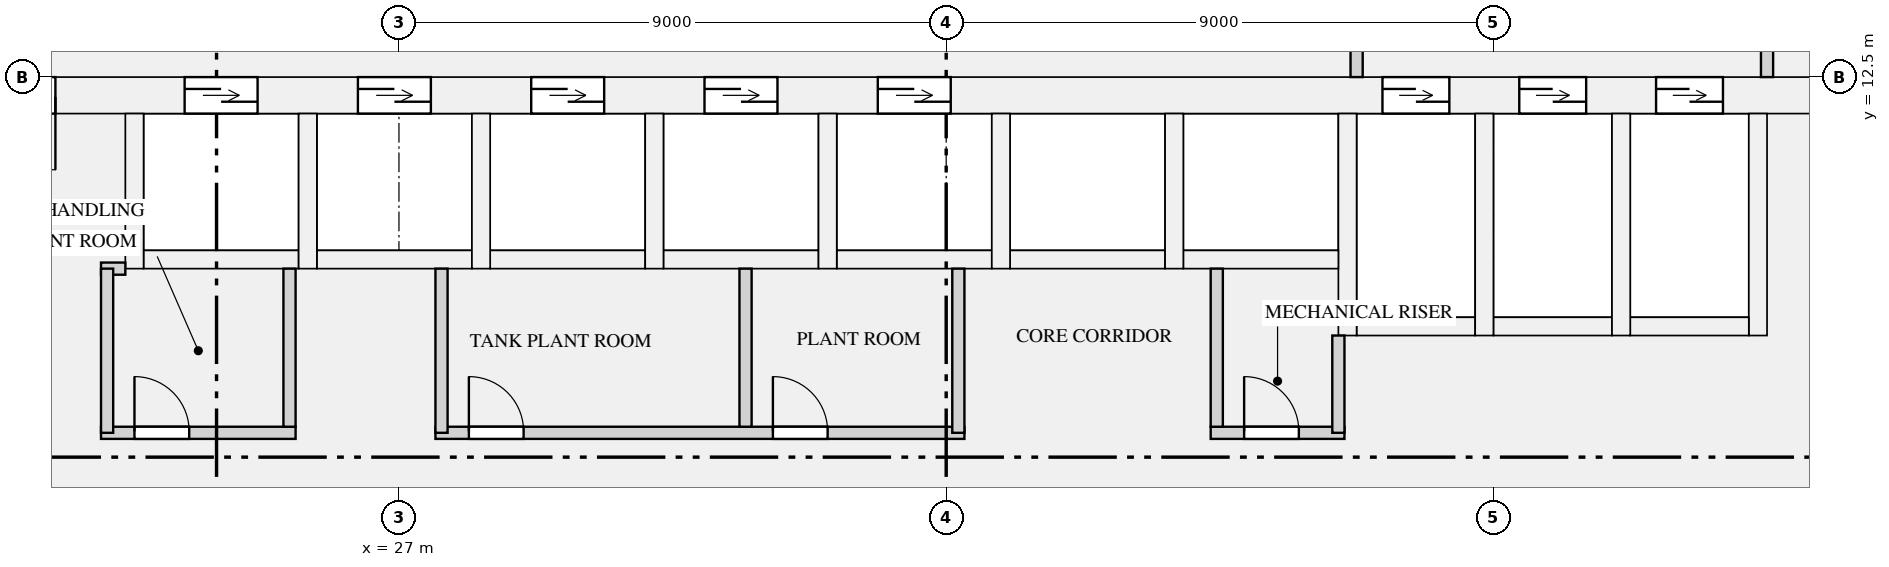
"""IFC4 building model, lengths in metres.
Left out: names, types, materials, properties, quantities, classifications, styles, units other than length and angle.
Written with IfcOpenShell. Run it as: python <this file> out.ifc"""

import sys

from ifc_helpers import new_model, si_unit, direction, frame, frame_2d, origin, place, context, subcontext, project, spatial, rectangle, extrude, element, fill, save


model = new_model("IFC4")
c1 = context("Model", 3, precision=1e-05, world=origin(), true_north=direction((0.0, 1.0)))
c2 = subcontext(c1, "Body", "Model", "MODEL_VIEW")
j1 = project(units=[si_unit("LENGTHUNIT", "METRE"), si_unit("PLANEANGLEUNIT", "RADIAN")], contexts=[c1])
p1 = place(None, origin())
s1 = spatial("IfcSite", under=j1, at=p1, CompositionType="ELEMENT")
p2 = place(p1, origin())
s2 = spatial("IfcBuilding", under=s1, at=p2, CompositionType="ELEMENT")
p3 = place(p2, frame((0.0, 0.0, 15.5)))
s3 = spatial("IfcBuildingStorey", under=s2, at=p3, CompositionType="ELEMENT", Elevation=15.5)
p4 = place(p3, frame((19.0, 12.2, 0.0), z_axis=(0.0, 0.0, 1.0), x_axis=(1.0, 0.0, 0.0)))
e1 = element("IfcWall", 1, at=p4, inside=s3, PredefinedType="SHEAR", context=c2, shape_type="SweptSolid", body=[
    extrude(rectangle(XDim=34.0, YDim=0.6, at=frame_2d((17.0, 0.0))), origin(), (0.0, 0.0, 1.0), 4.0),
])
p5 = place(p4, frame((4.475, 0.0, 0.0)))
e2 = element("IfcOpeningElement", 2, at=p5, cuts=e1, PredefinedType="OPENING", context=c2, shape_type="SweptSolid", body=[
    extrude(rectangle(XDim=1.2, YDim=2.1, at=frame_2d((0.6, 1.05))), frame((0.0, 0.31, 0.0), z_axis=(0.0, -1.0, 0.0), x_axis=(1.0, 0.0, 0.0)), (0.0, 0.0, 1.0), 0.62),
])
p6 = place(p4, frame((7.325, 0.0, 0.0)))
e3 = element("IfcOpeningElement", 3, at=p6, cuts=e1, PredefinedType="OPENING", context=c2, shape_type="SweptSolid", body=[
    extrude(rectangle(XDim=1.2, YDim=2.1, at=frame_2d((0.6, 1.05))), frame((0.0, 0.31, 0.0), z_axis=(0.0, -1.0, 0.0), x_axis=(1.0, 0.0, 0.0)), (0.0, 0.0, 1.0), 0.62),
])
p7 = place(p4, frame((10.175, 0.0, 0.0)))
e4 = element("IfcOpeningElement", 4, at=p7, cuts=e1, PredefinedType="OPENING", context=c2, shape_type="SweptSolid", body=[
    extrude(rectangle(XDim=1.2, YDim=2.1, at=frame_2d((0.6, 1.05))), frame((0.0, 0.31, 0.0), z_axis=(0.0, -1.0, 0.0), x_axis=(1.0, 0.0, 0.0)), (0.0, 0.0, 1.0), 0.62),
])
p8 = place(p4, frame((13.025, 0.0, 0.0)))
e5 = element("IfcOpeningElement", 5, at=p8, cuts=e1, PredefinedType="OPENING", context=c2, shape_type="SweptSolid", body=[
    extrude(rectangle(XDim=1.2, YDim=2.1, at=frame_2d((0.6, 1.05))), frame((0.0, 0.31, 0.0), z_axis=(0.0, -1.0, 0.0), x_axis=(1.0, 0.0, 0.0)), (0.0, 0.0, 1.0), 0.62),
])
p9 = place(p4, frame((15.875, 0.0, 0.0)))
e6 = element("IfcOpeningElement", 6, at=p9, cuts=e1, PredefinedType="OPENING", context=c2, shape_type="SweptSolid", body=[
    extrude(rectangle(XDim=1.2, YDim=2.1, at=frame_2d((0.6, 1.05))), frame((0.0, 0.31, 0.0), z_axis=(0.0, -1.0, 0.0), x_axis=(1.0, 0.0, 0.0)), (0.0, 0.0, 1.0), 0.62),
])
p10 = place(p4, frame((24.175, 0.0, 0.0)))
e7 = element("IfcOpeningElement", 7, at=p10, cuts=e1, PredefinedType="OPENING", context=c2, shape_type="SweptSolid", body=[
    extrude(rectangle(XDim=1.1, YDim=2.1, at=frame_2d((0.55, 1.05))), frame((0.0, 0.31, 0.0), z_axis=(0.0, -1.0, 0.0), x_axis=(1.0, 0.0, 0.0)), (0.0, 0.0, 1.0), 0.62),
])
p11 = place(p4, frame((26.425, 0.0, 0.0)))
e8 = element("IfcOpeningElement", 8, at=p11, cuts=e1, PredefinedType="OPENING", context=c2, shape_type="SweptSolid", body=[
    extrude(rectangle(XDim=1.1, YDim=2.1, at=frame_2d((0.55, 1.05))), frame((0.0, 0.31, 0.0), z_axis=(0.0, -1.0, 0.0), x_axis=(1.0, 0.0, 0.0)), (0.0, 0.0, 1.0), 0.62),
])
p12 = place(p4, frame((28.675, 0.0, 0.0)))
e9 = element("IfcOpeningElement", 9, at=p12, cuts=e1, PredefinedType="OPENING", context=c2, shape_type="SweptSolid", body=[
    extrude(rectangle(XDim=1.1, YDim=2.1, at=frame_2d((0.55, 1.05))), frame((0.0, 0.31, 0.0), z_axis=(0.0, -1.0, 0.0), x_axis=(1.0, 0.0, 0.0)), (0.0, 0.0, 1.0), 0.62),
])
p13 = place(p4, frame((1.15, 0.0, 0.0)))
e10 = element("IfcOpeningElement", 10, at=p13, cuts=e1, PredefinedType="OPENING", context=c2, shape_type="SweptSolid", body=[
    extrude(rectangle(XDim=1.2, YDim=2.1, at=frame_2d((0.6, 1.05))), frame((0.0, 0.31, 0.0), z_axis=(0.0, -1.0, 0.0), x_axis=(1.0, 0.0, 0.0)), (0.0, 0.0, 1.0), 0.62),
])
p14 = place(p4, frame((31.65, 0.0, 0.0)))
e11 = element("IfcOpeningElement", 11, at=p14, cuts=e1, PredefinedType="OPENING", context=c2, shape_type="SweptSolid", body=[
    extrude(rectangle(XDim=1.2, YDim=2.1, at=frame_2d((0.6, 1.05))), frame((0.0, 0.31, 0.0), z_axis=(0.0, -1.0, 0.0), x_axis=(1.0, 0.0, 0.0)), (0.0, 0.0, 1.0), 0.62),
])
p15 = place(p3, frame((22.8, 9.5, 0.0), z_axis=(0.0, 0.0, 1.0), x_axis=(1.0, 0.0, 0.0)))
e12 = element("IfcWall", 12, at=p15, inside=s3, PredefinedType="SHEAR", context=c2, shape_type="SweptSolid", body=[
    extrude(rectangle(XDim=2.55, YDim=0.3, at=frame_2d((1.275, 0.0))), origin(), (0.0, 0.0, 1.0), 4.0),
])
p16 = place(p3, frame((22.65, 9.35, 0.0), z_axis=(0.0, 0.0, 1.0), x_axis=(0.0, 1.0, 0.0)))
e13 = element("IfcWall", 13, at=p16, inside=s3, PredefinedType="SHEAR", context=c2, shape_type="SweptSolid", body=[
    extrude(rectangle(XDim=2.55, YDim=0.3, at=frame_2d((1.275, 0.0))), origin(), (0.0, 0.0, 1.0), 4.0),
])
p17 = place(p3, frame((25.65, 9.5, 0.0), z_axis=(0.0, 0.0, 1.0), x_axis=(1.0, 0.0, 0.0)))
e14 = element("IfcWall", 14, at=p17, inside=s3, PredefinedType="SHEAR", context=c2, shape_type="SweptSolid", body=[
    extrude(rectangle(XDim=2.55, YDim=0.3, at=frame_2d((1.275, 0.0))), origin(), (0.0, 0.0, 1.0), 4.0),
])
p18 = place(p3, frame((25.5, 9.35, 0.0), z_axis=(0.0, 0.0, 1.0), x_axis=(0.0, 1.0, 0.0)))
e15 = element("IfcWall", 15, at=p18, inside=s3, PredefinedType="SHEAR", context=c2, shape_type="SweptSolid", body=[
    extrude(rectangle(XDim=2.55, YDim=0.3, at=frame_2d((1.275, 0.0))), origin(), (0.0, 0.0, 1.0), 4.0),
])
p19 = place(p3, frame((28.5, 9.5, 0.0), z_axis=(0.0, 0.0, 1.0), x_axis=(1.0, 0.0, 0.0)))
e16 = element("IfcWall", 16, at=p19, inside=s3, PredefinedType="SHEAR", context=c2, shape_type="SweptSolid", body=[
    extrude(rectangle(XDim=2.55, YDim=0.3, at=frame_2d((1.275, 0.0))), origin(), (0.0, 0.0, 1.0), 4.0),
])
for number, where, z_axis, x_axis in (
    (17, (28.35, 9.35, 0.0), (0.0, 0.0, 1.0), (0.0, 1.0, 0.0)),
    (18, (31.35, 9.5, 0.0), (0.0, 0.0, 1.0), (1.0, 0.0, 0.0)),
    (19, (31.2, 9.35, 0.0), (0.0, 0.0, 1.0), (0.0, 1.0, 0.0)),
):
    element("IfcWall", number, at=place(p3, frame(where, z_axis=z_axis, x_axis=x_axis)), inside=s3, PredefinedType="SHEAR", context=c2, shape_type="SweptSolid", body=[
        extrude(rectangle(XDim=2.55, YDim=0.3, at=frame_2d((1.275, 0.0))), origin(), (0.0, 0.0, 1.0), 4.0),
    ])
p20 = place(p3, frame((34.2, 9.5, 0.0), z_axis=(0.0, 0.0, 1.0), x_axis=(1.0, 0.0, 0.0)))
e20 = element("IfcWall", 20, at=p20, inside=s3, PredefinedType="SHEAR", context=c2, shape_type="SweptSolid", body=[
    extrude(rectangle(XDim=2.55, YDim=0.3, at=frame_2d((1.275, 0.0))), origin(), (0.0, 0.0, 1.0), 4.0),
])
p21 = place(p3, frame((34.05, 9.35, 0.0), z_axis=(0.0, 0.0, 1.0), x_axis=(0.0, 1.0, 0.0)))
e21 = element("IfcWall", 21, at=p21, inside=s3, PredefinedType="SHEAR", context=c2, shape_type="SweptSolid", body=[
    extrude(rectangle(XDim=2.55, YDim=0.3, at=frame_2d((1.275, 0.0))), origin(), (0.0, 0.0, 1.0), 4.0),
])
p22 = place(p3, frame((37.05, 9.5, 0.0), z_axis=(0.0, 0.0, 1.0), x_axis=(1.0, 0.0, 0.0)))
e22 = element("IfcWall", 22, at=p22, inside=s3, PredefinedType="SHEAR", context=c2, shape_type="SweptSolid", body=[
    extrude(rectangle(XDim=2.55, YDim=0.3, at=frame_2d((1.275, 0.0))), origin(), (0.0, 0.0, 1.0), 4.0),
])
p23 = place(p3, frame((36.9, 9.35, 0.0), z_axis=(0.0, 0.0, 1.0), x_axis=(0.0, 1.0, 0.0)))
e23 = element("IfcWall", 23, at=p23, inside=s3, PredefinedType="SHEAR", context=c2, shape_type="SweptSolid", body=[
    extrude(rectangle(XDim=2.55, YDim=0.3, at=frame_2d((1.275, 0.0))), origin(), (0.0, 0.0, 1.0), 4.0),
])
p24 = place(p3, frame((39.9, 9.5, 0.0), z_axis=(0.0, 0.0, 1.0), x_axis=(1.0, 0.0, 0.0)))
e24 = element("IfcWall", 24, at=p24, inside=s3, PredefinedType="SHEAR", context=c2, shape_type="SweptSolid", body=[
    extrude(rectangle(XDim=2.55, YDim=0.3, at=frame_2d((1.275, 0.0))), origin(), (0.0, 0.0, 1.0), 4.0),
])
p25 = place(p3, frame((39.75, 9.35, 0.0), z_axis=(0.0, 0.0, 1.0), x_axis=(0.0, 1.0, 0.0)))
e25 = element("IfcWall", 25, at=p25, inside=s3, PredefinedType="SHEAR", context=c2, shape_type="SweptSolid", body=[
    extrude(rectangle(XDim=2.55, YDim=0.3, at=frame_2d((1.275, 0.0))), origin(), (0.0, 0.0, 1.0), 4.0),
])
p26 = place(p3, frame((42.75, 8.4, 0.0), z_axis=(0.0, 0.0, 1.0), x_axis=(1.0, 0.0, 0.0)))
e26 = element("IfcWall", 26, at=p26, inside=s3, PredefinedType="SHEAR", context=c2, shape_type="SweptSolid", body=[
    extrude(rectangle(XDim=1.95, YDim=0.3, at=frame_2d((0.975, 0.0))), origin(), (0.0, 0.0, 1.0), 4.0),
])
p27 = place(p3, frame((42.6, 8.25, 0.0), z_axis=(0.0, 0.0, 1.0), x_axis=(0.0, 1.0, 0.0)))
e27 = element("IfcWall", 27, at=p27, inside=s3, PredefinedType="SHEAR", context=c2, shape_type="SweptSolid", body=[
    extrude(rectangle(XDim=3.65, YDim=0.3, at=frame_2d((1.825, 0.0))), origin(), (0.0, 0.0, 1.0), 4.0),
])
p28 = place(p3, frame((45.0, 8.4, 0.0), z_axis=(0.0, 0.0, 1.0), x_axis=(1.0, 0.0, 0.0)))
e28 = element("IfcWall", 28, at=p28, inside=s3, PredefinedType="SHEAR", context=c2, shape_type="SweptSolid", body=[
    extrude(rectangle(XDim=1.95, YDim=0.3, at=frame_2d((0.975, 0.0))), origin(), (0.0, 0.0, 1.0), 4.0),
])
p29 = place(p3, frame((44.85, 8.25, 0.0), z_axis=(0.0, 0.0, 1.0), x_axis=(0.0, 1.0, 0.0)))
e29 = element("IfcWall", 29, at=p29, inside=s3, PredefinedType="SHEAR", context=c2, shape_type="SweptSolid", body=[
    extrude(rectangle(XDim=3.65, YDim=0.3, at=frame_2d((1.825, 0.0))), origin(), (0.0, 0.0, 1.0), 4.0),
])
p30 = place(p3, frame((47.25, 8.4, 0.0), z_axis=(0.0, 0.0, 1.0), x_axis=(1.0, 0.0, 0.0)))
e30 = element("IfcWall", 30, at=p30, inside=s3, PredefinedType="SHEAR", context=c2, shape_type="SweptSolid", body=[
    extrude(rectangle(XDim=1.95, YDim=0.3, at=frame_2d((0.975, 0.0))), origin(), (0.0, 0.0, 1.0), 4.0),
])
for number, where, z_axis, x_axis in (
    (31, (47.1, 8.25, 0.0), (0.0, 0.0, 1.0), (0.0, 1.0, 0.0)),
    (32, (49.35, 8.25, 0.0), (0.0, 0.0, 1.0), (0.0, 1.0, 0.0)),
):
    element("IfcWall", number, at=place(p3, frame(where, z_axis=z_axis, x_axis=x_axis)), inside=s3, PredefinedType="SHEAR", context=c2, shape_type="SweptSolid", body=[
        extrude(rectangle(XDim=3.65, YDim=0.3, at=frame_2d((1.825, 0.0))), origin(), (0.0, 0.0, 1.0), 4.0),
    ])
p31 = place(p3, frame((22.1, 6.65, 0.0), z_axis=(0.0, 0.0, 1.0), x_axis=(1.0, 0.0, 0.0)))
e33 = element("IfcWall", 33, at=p31, inside=s3, PredefinedType="PARTITIONING", context=c2, shape_type="SweptSolid", body=[
    extrude(rectangle(XDim=3.2, YDim=0.2, at=frame_2d((1.6, 0.0))), origin(), (0.0, 0.0, 1.0), 3.68),
])
p32 = place(p31, frame((0.55, 0.0, 0.0)))
e34 = element("IfcOpeningElement", 34, at=p32, cuts=e33, PredefinedType="OPENING", context=c2, shape_type="SweptSolid", body=[
    extrude(rectangle(XDim=0.9, YDim=2.1, at=frame_2d((0.45, 1.05))), frame((0.0, 0.11, 0.0), z_axis=(0.0, -1.0, 0.0), x_axis=(1.0, 0.0, 0.0)), (0.0, 0.0, 1.0), 0.22),
])
p33 = place(p3, frame((27.6, 6.65, 0.0), z_axis=(0.0, 0.0, 1.0), x_axis=(1.0, 0.0, 0.0)))
e35 = element("IfcWall", 35, at=p33, inside=s3, PredefinedType="PARTITIONING", context=c2, shape_type="SweptSolid", body=[
    extrude(rectangle(XDim=8.7, YDim=0.2, at=frame_2d((4.35, 0.0))), origin(), (0.0, 0.0, 1.0), 3.68),
])
p34 = place(p33, frame((0.55, 0.0, 0.0)))
e36 = element("IfcOpeningElement", 36, at=p34, cuts=e35, PredefinedType="OPENING", context=c2, shape_type="SweptSolid", body=[
    extrude(rectangle(XDim=0.9, YDim=2.1, at=frame_2d((0.45, 1.05))), frame((0.0, 0.11, 0.0), z_axis=(0.0, -1.0, 0.0), x_axis=(1.0, 0.0, 0.0)), (0.0, 0.0, 1.0), 0.22),
])
p35 = place(p33, frame((5.55, 0.0, 0.0)))
e37 = element("IfcOpeningElement", 37, at=p35, cuts=e35, PredefinedType="OPENING", context=c2, shape_type="SweptSolid", body=[
    extrude(rectangle(XDim=0.9, YDim=2.1, at=frame_2d((0.45, 1.05))), frame((0.0, 0.11, 0.0), z_axis=(0.0, -1.0, 0.0), x_axis=(1.0, 0.0, 0.0)), (0.0, 0.0, 1.0), 0.22),
])
p36 = place(p3, frame((40.35, 6.65, 0.0), z_axis=(0.0, 0.0, 1.0), x_axis=(1.0, 0.0, 0.0)))
e38 = element("IfcWall", 38, at=p36, inside=s3, PredefinedType="PARTITIONING", context=c2, shape_type="SweptSolid", body=[
    extrude(rectangle(XDim=2.2, YDim=0.2, at=frame_2d((1.1, 0.0))), origin(), (0.0, 0.0, 1.0), 3.68),
])
p37 = place(p36, frame((0.55, 0.0, 0.0)))
e39 = element("IfcOpeningElement", 39, at=p37, cuts=e38, PredefinedType="OPENING", context=c2, shape_type="SweptSolid", body=[
    extrude(rectangle(XDim=0.9, YDim=2.1, at=frame_2d((0.45, 1.05))), frame((0.0, 0.11, 0.0), z_axis=(0.0, -1.0, 0.0), x_axis=(1.0, 0.0, 0.0)), (0.0, 0.0, 1.0), 0.22),
])
p38 = place(p3, frame((22.1, 9.35, 0.0), z_axis=(0.0, 0.0, 1.0), x_axis=(1.0, 0.0, 0.0)))
e40 = element("IfcWall", 40, at=p38, inside=s3, PredefinedType="PARTITIONING", context=c2, shape_type="SweptSolid", body=[
    extrude(rectangle(XDim=0.4, YDim=0.2, at=frame_2d((0.2, 0.0))), origin(), (0.0, 0.0, 1.0), 3.68),
])
for number, where, z_axis, x_axis in (
    (41, (22.2, 6.65, 0.0), (0.0, 0.0, 1.0), (0.0, 1.0, 0.0)),
    (42, (27.7, 6.65, 0.0), (0.0, 0.0, 1.0), (0.0, 1.0, 0.0)),
    (43, (36.2, 6.65, 0.0), (0.0, 0.0, 1.0), (0.0, 1.0, 0.0)),
):
    element("IfcWall", number, at=place(p3, frame(where, z_axis=z_axis, x_axis=x_axis)), inside=s3, PredefinedType="PARTITIONING", context=c2, shape_type="SweptSolid", body=[
        extrude(rectangle(XDim=2.7, YDim=0.2, at=frame_2d((1.35, 0.0))), origin(), (0.0, 0.0, 1.0), 3.68),
    ])
p39 = place(p3, frame((42.45, 6.65, 0.0), z_axis=(0.0, 0.0, 1.0), x_axis=(0.0, 1.0, 0.0)))
e44 = element("IfcWall", 44, at=p39, inside=s3, PredefinedType="PARTITIONING", context=c2, shape_type="SweptSolid", body=[
    extrude(rectangle(XDim=1.6, YDim=0.2, at=frame_2d((0.8, 0.0))), origin(), (0.0, 0.0, 1.0), 3.68),
])
for number, where, z_axis, x_axis in (
    (45, (25.2, 6.75, 0.0), (0.0, 0.0, 1.0), (0.0, 1.0, 0.0)),
    (46, (32.7, 6.75, 0.0), (0.0, 0.0, 1.0), (0.0, 1.0, 0.0)),
    (47, (40.45, 6.75, 0.0), (0.0, 0.0, 1.0), (0.0, 1.0, 0.0)),
):
    element("IfcWall", number, at=place(p3, frame(where, z_axis=z_axis, x_axis=x_axis)), inside=s3, PredefinedType="PARTITIONING", context=c2, shape_type="SweptSolid", body=[
        extrude(rectangle(XDim=2.6, YDim=0.2, at=frame_2d((1.3, 0.0))), origin(), (0.0, 0.0, 1.0), 3.68),
    ])
p40 = place(p3, frame((42.75, 12.5, 0.0), z_axis=(0.0, 0.0, 1.0), x_axis=(0.0, 1.0, 0.0)))
e48 = element("IfcWall", 48, at=p40, inside=s3, PredefinedType="PARTITIONING", context=c2, shape_type="SweptSolid", body=[
    extrude(rectangle(XDim=3.4, YDim=0.2, at=frame_2d((1.7, 0.0))), origin(), (0.0, 0.0, 1.0), 3.68),
])
p41 = place(p40, frame((2.2, 0.0, 0.0)))
e49 = element("IfcOpeningElement", 49, at=p41, cuts=e48, PredefinedType="OPENING", context=c2, shape_type="SweptSolid", body=[
    extrude(rectangle(XDim=1.0, YDim=2.1, at=frame_2d((0.5, 1.05))), frame((0.0, 0.11, 0.0), z_axis=(0.0, -1.0, 0.0), x_axis=(1.0, 0.0, 0.0)), (0.0, 0.0, 1.0), 0.22),
])
p42 = place(p3, frame((49.5, 12.5, 0.0), z_axis=(0.0, 0.0, 1.0), x_axis=(0.0, 1.0, 0.0)))
e50 = element("IfcWall", 50, at=p42, inside=s3, PredefinedType="PARTITIONING", context=c2, shape_type="SweptSolid", body=[
    extrude(rectangle(XDim=3.4, YDim=0.2, at=frame_2d((1.7, 0.0))), origin(), (0.0, 0.0, 1.0), 3.68),
])
p43 = place(p42, frame((1.15, 0.0, 0.0)))
e51 = element("IfcOpeningElement", 51, at=p43, cuts=e50, PredefinedType="OPENING", context=c2, shape_type="SweptSolid", body=[
    extrude(rectangle(XDim=1.1, YDim=2.1, at=frame_2d((0.55, 1.05))), frame((0.0, 0.11, 0.0), z_axis=(0.0, -1.0, 0.0), x_axis=(1.0, 0.0, 0.0)), (0.0, 0.0, 1.0), 0.22),
])
p44 = place(p5, origin())
e52 = element("IfcDoor", 52, at=p44, inside=s3, OperationType="DOUBLE_DOOR_SLIDING", PredefinedType="DOOR", context=c2, shape_type="SweptSolid", body=[
    extrude(rectangle(XDim=1.2, YDim=2.1, at=frame_2d((0.6, 1.05))), frame((0.0, 0.025, 0.0), z_axis=(0.0, -1.0, 0.0), x_axis=(1.0, 0.0, 0.0)), (0.0, 0.0, 1.0), 0.05),
])
fill(e2, e52)
p45 = place(p6, origin())
e53 = element("IfcDoor", 53, at=p45, inside=s3, OperationType="DOUBLE_DOOR_SLIDING", PredefinedType="DOOR", context=c2, shape_type="SweptSolid", body=[
    extrude(rectangle(XDim=1.2, YDim=2.1, at=frame_2d((0.6, 1.05))), frame((0.0, 0.025, 0.0), z_axis=(0.0, -1.0, 0.0), x_axis=(1.0, 0.0, 0.0)), (0.0, 0.0, 1.0), 0.05),
])
fill(e3, e53)
p46 = place(p7, origin())
e54 = element("IfcDoor", 54, at=p46, inside=s3, OperationType="DOUBLE_DOOR_SLIDING", PredefinedType="DOOR", context=c2, shape_type="SweptSolid", body=[
    extrude(rectangle(XDim=1.2, YDim=2.1, at=frame_2d((0.6, 1.05))), frame((0.0, 0.025, 0.0), z_axis=(0.0, -1.0, 0.0), x_axis=(1.0, 0.0, 0.0)), (0.0, 0.0, 1.0), 0.05),
])
fill(e4, e54)
p47 = place(p8, origin())
e55 = element("IfcDoor", 55, at=p47, inside=s3, OperationType="DOUBLE_DOOR_SLIDING", PredefinedType="DOOR", context=c2, shape_type="SweptSolid", body=[
    extrude(rectangle(XDim=1.2, YDim=2.1, at=frame_2d((0.6, 1.05))), frame((0.0, 0.025, 0.0), z_axis=(0.0, -1.0, 0.0), x_axis=(1.0, 0.0, 0.0)), (0.0, 0.0, 1.0), 0.05),
])
fill(e5, e55)
p48 = place(p9, origin())
e56 = element("IfcDoor", 56, at=p48, inside=s3, OperationType="DOUBLE_DOOR_SLIDING", PredefinedType="DOOR", context=c2, shape_type="SweptSolid", body=[
    extrude(rectangle(XDim=1.2, YDim=2.1, at=frame_2d((0.6, 1.05))), frame((0.0, 0.025, 0.0), z_axis=(0.0, -1.0, 0.0), x_axis=(1.0, 0.0, 0.0)), (0.0, 0.0, 1.0), 0.05),
])
fill(e6, e56)
p49 = place(p10, origin())
e57 = element("IfcDoor", 57, at=p49, inside=s3, OperationType="DOUBLE_DOOR_SLIDING", PredefinedType="DOOR", context=c2, shape_type="SweptSolid", body=[
    extrude(rectangle(XDim=1.1, YDim=2.1, at=frame_2d((0.55, 1.05))), frame((0.0, 0.025, 0.0), z_axis=(0.0, -1.0, 0.0), x_axis=(1.0, 0.0, 0.0)), (0.0, 0.0, 1.0), 0.05),
])
fill(e7, e57)
p50 = place(p11, origin())
e58 = element("IfcDoor", 58, at=p50, inside=s3, OperationType="DOUBLE_DOOR_SLIDING", PredefinedType="DOOR", context=c2, shape_type="SweptSolid", body=[
    extrude(rectangle(XDim=1.1, YDim=2.1, at=frame_2d((0.55, 1.05))), frame((0.0, 0.025, 0.0), z_axis=(0.0, -1.0, 0.0), x_axis=(1.0, 0.0, 0.0)), (0.0, 0.0, 1.0), 0.05),
])
fill(e8, e58)
p51 = place(p12, origin())
e59 = element("IfcDoor", 59, at=p51, inside=s3, OperationType="DOUBLE_DOOR_SLIDING", PredefinedType="DOOR", context=c2, shape_type="SweptSolid", body=[
    extrude(rectangle(XDim=1.1, YDim=2.1, at=frame_2d((0.55, 1.05))), frame((0.0, 0.025, 0.0), z_axis=(0.0, -1.0, 0.0), x_axis=(1.0, 0.0, 0.0)), (0.0, 0.0, 1.0), 0.05),
])
fill(e9, e59)
p52 = place(p32, origin())
e60 = element("IfcDoor", 60, at=p52, inside=s3, OperationType="SINGLE_SWING_LEFT", PredefinedType="DOOR", context=c2, shape_type="SweptSolid", body=[
    extrude(rectangle(XDim=0.9, YDim=2.1, at=frame_2d((0.45, 1.05))), frame((0.0, 0.025, 0.0), z_axis=(0.0, -1.0, 0.0), x_axis=(1.0, 0.0, 0.0)), (0.0, 0.0, 1.0), 0.05),
])
fill(e34, e60)
p53 = place(p34, origin())
e61 = element("IfcDoor", 61, at=p53, inside=s3, OperationType="SINGLE_SWING_LEFT", PredefinedType="DOOR", context=c2, shape_type="SweptSolid", body=[
    extrude(rectangle(XDim=0.9, YDim=2.1, at=frame_2d((0.45, 1.05))), frame((0.0, 0.025, 0.0), z_axis=(0.0, -1.0, 0.0), x_axis=(1.0, 0.0, 0.0)), (0.0, 0.0, 1.0), 0.05),
])
fill(e36, e61)
p54 = place(p35, origin())
e62 = element("IfcDoor", 62, at=p54, inside=s3, OperationType="SINGLE_SWING_LEFT", PredefinedType="DOOR", context=c2, shape_type="SweptSolid", body=[
    extrude(rectangle(XDim=0.9, YDim=2.1, at=frame_2d((0.45, 1.05))), frame((0.0, 0.025, 0.0), z_axis=(0.0, -1.0, 0.0), x_axis=(1.0, 0.0, 0.0)), (0.0, 0.0, 1.0), 0.05),
])
fill(e37, e62)
p55 = place(p37, origin())
e63 = element("IfcDoor", 63, at=p55, inside=s3, OperationType="SINGLE_SWING_LEFT", PredefinedType="DOOR", context=c2, shape_type="SweptSolid", body=[
    extrude(rectangle(XDim=0.9, YDim=2.1, at=frame_2d((0.45, 1.05))), frame((0.0, 0.025, 0.0), z_axis=(0.0, -1.0, 0.0), x_axis=(1.0, 0.0, 0.0)), (0.0, 0.0, 1.0), 0.05),
])
fill(e39, e63)
p56 = place(p13, frame((1.2, 0.0, 0.0), z_axis=(0.0, 0.0, 1.0), x_axis=(-1.0, 0.0, 0.0)))
e64 = element("IfcDoor", 64, at=p56, inside=s3, OperationType="SINGLE_SWING_LEFT", PredefinedType="DOOR", context=c2, shape_type="SweptSolid", body=[
    extrude(rectangle(XDim=1.2, YDim=2.1, at=frame_2d((0.6, 1.05))), frame((0.0, 0.025, 0.0), z_axis=(0.0, -1.0, 0.0), x_axis=(1.0, 0.0, 0.0)), (0.0, 0.0, 1.0), 0.05),
])
fill(e10, e64)
save(model, sys.argv[1])
